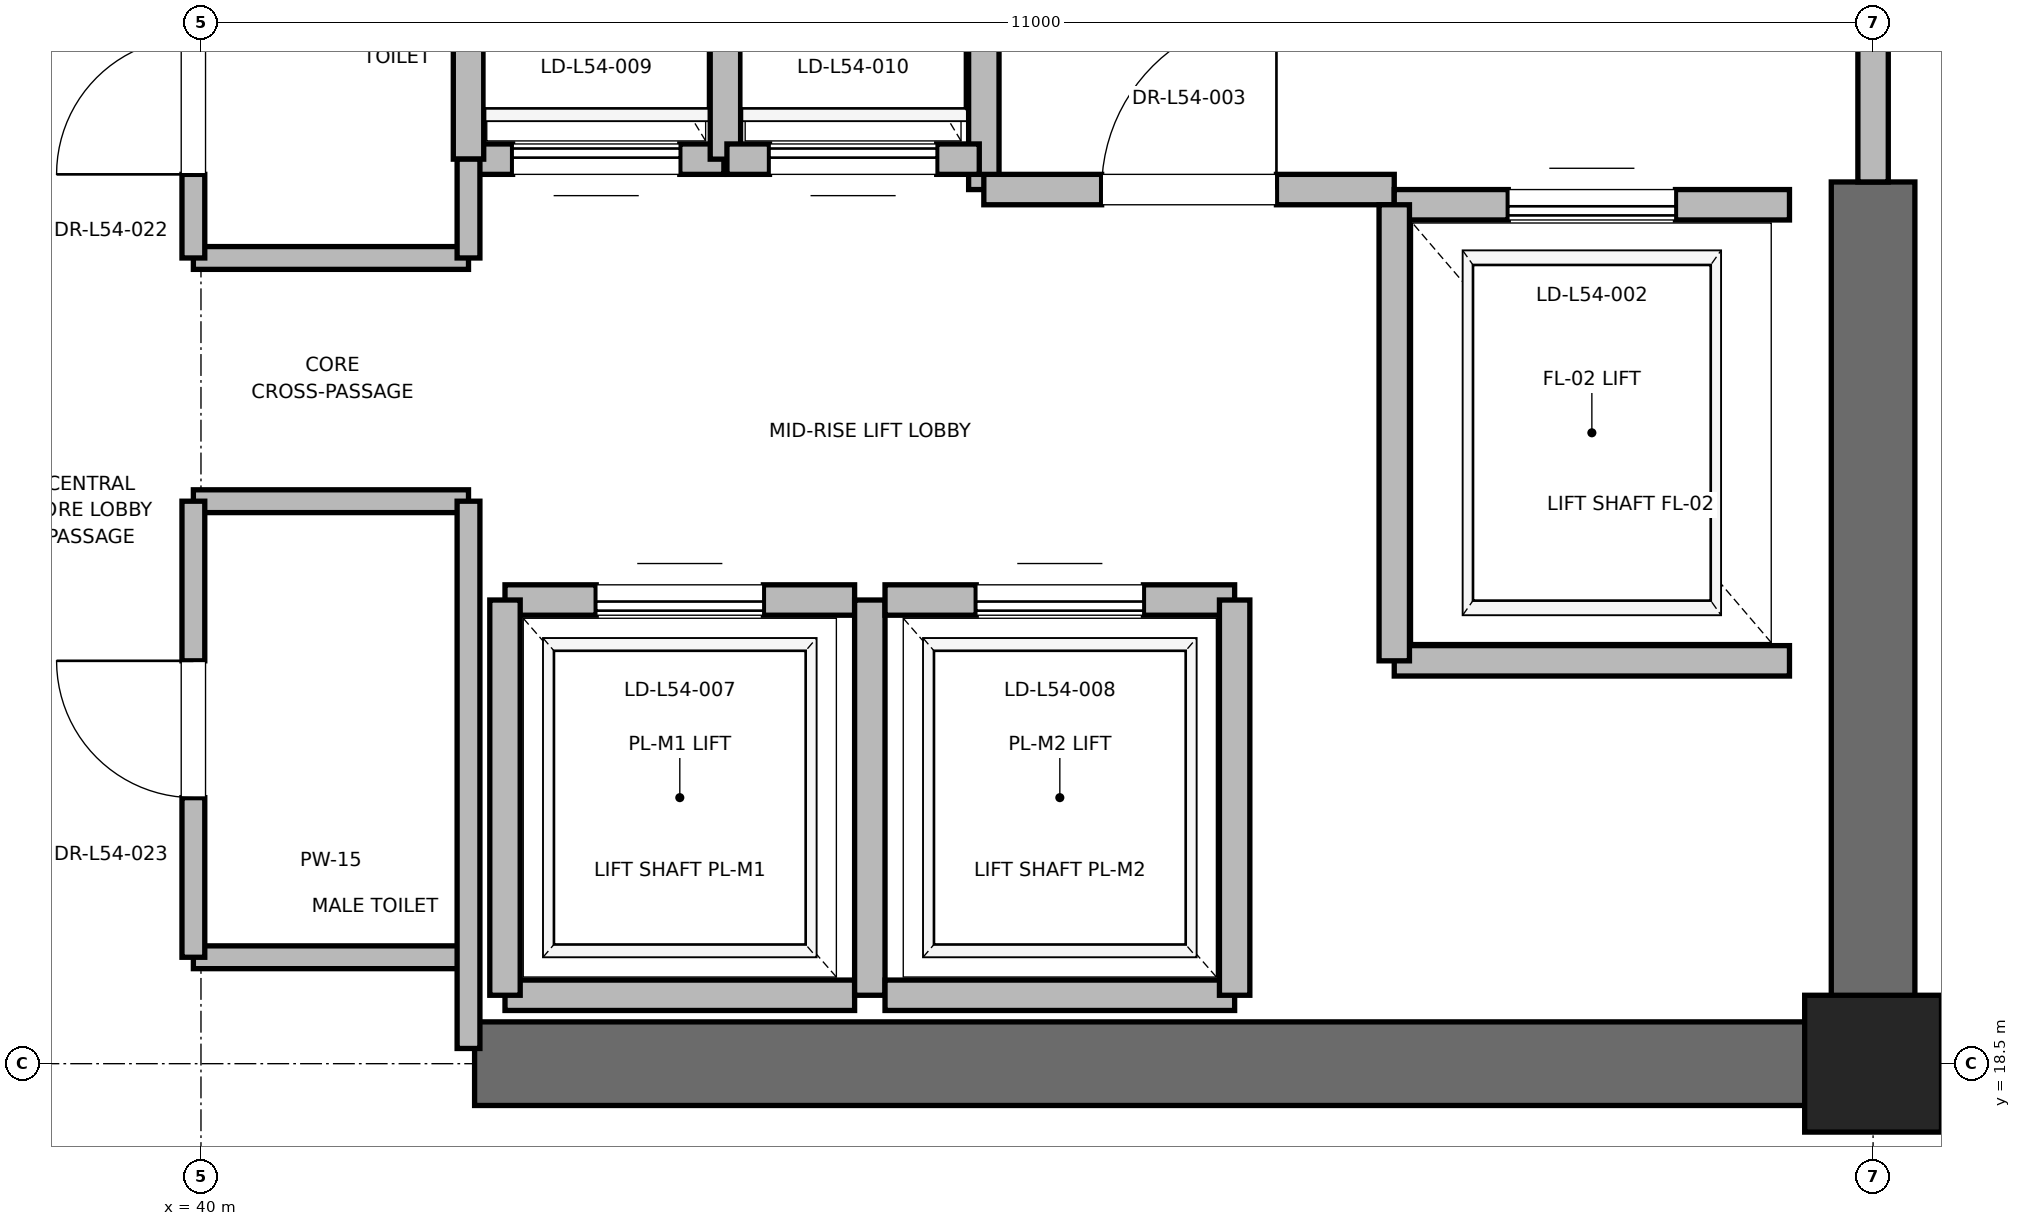
"""IFC4 building model, lengths in metres.
Left out: names, types, materials, properties, quantities, classifications, styles, units other than length and angle.
Written with IfcOpenShell. Run it as: python <this file> out.ifc"""

import sys

from ifc_helpers import new_model, si_unit, direction, frame, frame_2d, origin, origin_2d, place, context, subcontext, project, spatial, rectangle, extrude, element, fill, save


model = new_model("IFC4")
c1 = context("Model", 3, precision=1e-05, world=origin(), true_north=direction((0.0, 1.0)))
c2 = subcontext(c1, "Body", "Model", "MODEL_VIEW")
j1 = project(units=[si_unit("LENGTHUNIT", "METRE"), si_unit("PLANEANGLEUNIT", "RADIAN")], contexts=[c1])
p1 = place(None, origin())
s1 = spatial("IfcSite", under=j1, at=p1, CompositionType="ELEMENT")
p2 = place(p1, origin())
s2 = spatial("IfcBuilding", under=s1, at=p2, CompositionType="ELEMENT")
p3 = place(p2, frame((0.0, 0.0, 233.2)))
s3 = spatial("IfcBuildingStorey", under=s2, at=p3, CompositionType="ELEMENT", Elevation=233.2)
p4 = place(p3, frame((51.0, 18.5, 0.0), z_axis=(0.0, 0.0, 1.0), x_axis=(1.0, 0.0, 0.0)))
e1 = element("IfcColumn", 1, at=p4, inside=s3, PredefinedType="PILASTER", context=c2, shape_type="SweptSolid", body=[
    extrude(rectangle(XDim=0.9, YDim=0.9, at=origin_2d()), origin(), (0.0, 0.0, 1.0), 5.0),
])
p5 = place(p3, frame((41.8, 18.5, 0.0), z_axis=(0.0, 0.0, 1.0), x_axis=(1.0, 0.0, 0.0)))
e2 = element("IfcWall", 2, at=p5, inside=s3, PredefinedType="SHEAR", context=c2, shape_type="SweptSolid", body=[
    extrude(rectangle(XDim=9.2, YDim=0.55, at=frame_2d((4.6, 0.0))), origin(), (0.0, 0.0, 1.0), 4.7),
])
p6 = place(p3, frame((51.0, 18.5, 0.0), z_axis=(0.0, 0.0, 1.0), x_axis=(0.0, 1.0, 0.0)))
e3 = element("IfcWall", 3, at=p6, inside=s3, PredefinedType="SHEAR", context=c2, shape_type="SweptSolid", body=[
    extrude(rectangle(XDim=5.8, YDim=0.55, at=frame_2d((2.9, 0.0))), origin(), (0.0, 0.0, 1.0), 4.7),
])
p7 = place(p3, frame((45.15, 24.25, 0.0), z_axis=(0.0, 0.0, 1.0), x_axis=(0.0, 1.0, 0.0)))
e4 = element("IfcWall", 4, at=p7, inside=s3, PredefinedType="PARTITIONING", context=c2, shape_type="SweptSolid", body=[
    extrude(rectangle(XDim=3.37, YDim=0.2, at=frame_2d((1.685, 0.0))), origin(), (0.0, 0.0, 1.0), 4.7),
])
p8 = place(p3, frame((45.15, 24.25, 0.0), z_axis=(0.0, 0.0, 1.0), x_axis=(1.0, 0.0, 0.0)))
e5 = element("IfcWall", 5, at=p8, inside=s3, PredefinedType="PARTITIONING", context=c2, shape_type="SweptSolid", body=[
    extrude(rectangle(XDim=2.7, YDim=0.2, at=frame_2d((1.35, 0.0))), origin(), (0.0, 0.0, 1.0), 4.7),
])
p9 = place(p8, frame((0.775, 0.0, 0.0)))
e6 = element("IfcOpeningElement", 6, at=p9, cuts=e5, PredefinedType="OPENING", context=c2, shape_type="SweptSolid", body=[
    extrude(rectangle(XDim=1.15, YDim=2.2, at=frame_2d((0.575, 1.1))), frame((0.0, 0.1, 0.0), z_axis=(0.0, -1.0, 0.0), x_axis=(1.0, 0.0, 0.0)), (0.0, 0.0, 1.0), 0.2),
])
p10 = place(p3, frame((51.0, 24.3, 0.0), z_axis=(0.0, 0.0, 1.0), x_axis=(0.0, 1.0, 0.0)))
e7 = element("IfcWall", 7, at=p10, inside=s3, PredefinedType="PARTITIONING", context=c2, shape_type="SweptSolid", body=[
    extrude(rectangle(XDim=3.4, YDim=0.2, at=frame_2d((1.7, 0.0))), origin(), (0.0, 0.0, 1.0), 3.68),
])
p11 = place(p10, frame((1.125, 0.0, 0.0)))
e8 = element("IfcOpeningElement", 8, at=p11, cuts=e7, PredefinedType="OPENING", context=c2, shape_type="SweptSolid", body=[
    extrude(rectangle(XDim=1.15, YDim=2.2, at=frame_2d((0.575, 1.1))), frame((0.0, 0.1, 0.0), z_axis=(0.0, -1.0, 0.0), x_axis=(1.0, 0.0, 0.0)), (0.0, 0.0, 1.0), 0.2),
])
p12 = place(p3, frame((47.85, 21.15, 0.0), z_axis=(0.0, 0.0, 1.0), x_axis=(1.0, 0.0, 0.0)))
e9 = element("IfcWall", 9, at=p12, inside=s3, PredefinedType="SOLIDWALL", context=c2, shape_type="SweptSolid", body=[
    extrude(rectangle(XDim=2.6, YDim=0.2, at=frame_2d((1.3, 0.0))), origin(), (0.0, 0.0, 1.0), 4.7),
])
p13 = place(p3, frame((50.45, 24.15, 0.0), z_axis=(0.0, 0.0, 1.0), x_axis=(-1.0, 0.0, 0.0)))
e10 = element("IfcWall", 10, at=p13, inside=s3, PredefinedType="SOLIDWALL", context=c2, shape_type="SweptSolid", body=[
    extrude(rectangle(XDim=2.6, YDim=0.2, at=frame_2d((1.3, 0.0))), origin(), (0.0, 0.0, 1.0), 3.68),
])
p14 = place(p13, frame((0.75, 0.0, 0.0)))
e11 = element("IfcOpeningElement", 11, at=p14, cuts=e10, PredefinedType="OPENING", context=c2, shape_type="SweptSolid", body=[
    extrude(rectangle(XDim=1.1, YDim=2.2, at=frame_2d((0.55, 1.1))), frame((0.0, 0.1, 0.0), z_axis=(0.0, -1.0, 0.0), x_axis=(1.0, 0.0, 0.0)), (0.0, 0.0, 1.0), 0.2),
])
p15 = place(p3, frame((47.85, 24.15, 0.0), z_axis=(0.0, 0.0, 1.0), x_axis=(0.0, -1.0, 0.0)))
e12 = element("IfcWall", 12, at=p15, inside=s3, PredefinedType="SOLIDWALL", context=c2, shape_type="SweptSolid", body=[
    extrude(rectangle(XDim=3.0, YDim=0.2, at=frame_2d((1.5, 0.0))), origin(), (0.0, 0.0, 1.0), 4.7),
])
p16 = place(p3, frame((42.0, 18.95, 0.0), z_axis=(0.0, 0.0, 1.0), x_axis=(1.0, 0.0, 0.0)))
e13 = element("IfcWall", 13, at=p16, inside=s3, PredefinedType="SOLIDWALL", context=c2, shape_type="SweptSolid", body=[
    extrude(rectangle(XDim=2.3, YDim=0.2, at=frame_2d((1.15, 0.0))), origin(), (0.0, 0.0, 1.0), 3.68),
])
p17 = place(p3, frame((44.3, 21.55, 0.0), z_axis=(0.0, 0.0, 1.0), x_axis=(-1.0, 0.0, 0.0)))
e14 = element("IfcWall", 14, at=p17, inside=s3, PredefinedType="SOLIDWALL", context=c2, shape_type="SweptSolid", body=[
    extrude(rectangle(XDim=2.3, YDim=0.2, at=frame_2d((1.15, 0.0))), origin(), (0.0, 0.0, 1.0), 4.7),
])
p18 = place(p17, frame((0.6, 0.0, 0.0)))
e15 = element("IfcOpeningElement", 15, at=p18, cuts=e14, PredefinedType="OPENING", context=c2, shape_type="SweptSolid", body=[
    extrude(rectangle(XDim=1.1, YDim=2.2, at=frame_2d((0.55, 1.1))), frame((0.0, 0.1, 0.0), z_axis=(0.0, -1.0, 0.0), x_axis=(1.0, 0.0, 0.0)), (0.0, 0.0, 1.0), 0.2),
])
p19 = place(p3, frame((42.0, 21.55, 0.0), z_axis=(0.0, 0.0, 1.0), x_axis=(0.0, -1.0, 0.0)))
e16 = element("IfcWall", 16, at=p19, inside=s3, PredefinedType="SOLIDWALL", context=c2, shape_type="SweptSolid", body=[
    extrude(rectangle(XDim=2.6, YDim=0.2, at=frame_2d((1.3, 0.0))), origin(), (0.0, 0.0, 1.0), 3.68),
])
p20 = place(p3, frame((44.4, 18.95, 0.0), z_axis=(0.0, 0.0, 1.0), x_axis=(0.0, 1.0, 0.0)))
e17 = element("IfcWall", 17, at=p20, inside=s3, PredefinedType="SOLIDWALL", context=c2, shape_type="SweptSolid", body=[
    extrude(rectangle(XDim=2.6, YDim=0.2, at=frame_2d((1.3, 0.0))), origin(), (0.0, 0.0, 1.0), 4.7),
])
p21 = place(p3, frame((44.5, 18.95, 0.0), z_axis=(0.0, 0.0, 1.0), x_axis=(1.0, 0.0, 0.0)))
e18 = element("IfcWall", 18, at=p21, inside=s3, PredefinedType="SOLIDWALL", context=c2, shape_type="SweptSolid", body=[
    extrude(rectangle(XDim=2.3, YDim=0.2, at=frame_2d((1.15, 0.0))), origin(), (0.0, 0.0, 1.0), 4.7),
])
p22 = place(p3, frame((46.8, 21.55, 0.0), z_axis=(0.0, 0.0, 1.0), x_axis=(-1.0, 0.0, 0.0)))
e19 = element("IfcWall", 19, at=p22, inside=s3, PredefinedType="SOLIDWALL", context=c2, shape_type="SweptSolid", body=[
    extrude(rectangle(XDim=2.3, YDim=0.2, at=frame_2d((1.15, 0.0))), origin(), (0.0, 0.0, 1.0), 4.7),
])
p23 = place(p22, frame((0.6, 0.0, 0.0)))
e20 = element("IfcOpeningElement", 20, at=p23, cuts=e19, PredefinedType="OPENING", context=c2, shape_type="SweptSolid", body=[
    extrude(rectangle(XDim=1.1, YDim=2.2, at=frame_2d((0.55, 1.1))), frame((0.0, 0.1, 0.0), z_axis=(0.0, -1.0, 0.0), x_axis=(1.0, 0.0, 0.0)), (0.0, 0.0, 1.0), 0.2),
])
p24 = place(p3, frame((46.8, 18.95, 0.0), z_axis=(0.0, 0.0, 1.0), x_axis=(0.0, 1.0, 0.0)))
e21 = element("IfcWall", 21, at=p24, inside=s3, PredefinedType="SOLIDWALL", context=c2, shape_type="SweptSolid", body=[
    extrude(rectangle(XDim=2.6, YDim=0.2, at=frame_2d((1.3, 0.0))), origin(), (0.0, 0.0, 1.0), 4.7),
])
p25 = place(p3, frame((41.76, 24.45, 0.0), z_axis=(0.0, 0.0, 1.0), x_axis=(1.0, 0.0, 0.0)))
e22 = element("IfcWall", 22, at=p25, inside=s3, PredefinedType="SOLIDWALL", context=c2, shape_type="SweptSolid", body=[
    extrude(rectangle(XDim=1.68, YDim=0.2, at=frame_2d((0.84, 0.0))), origin(), (0.0, 0.0, 1.0), 4.7),
])
p26 = place(p25, frame((0.29, 0.0, 0.0)))
e23 = element("IfcOpeningElement", 23, at=p26, cuts=e22, PredefinedType="OPENING", context=c2, shape_type="SweptSolid", body=[
    extrude(rectangle(XDim=1.1, YDim=2.2, at=frame_2d((0.55, 1.1))), frame((0.0, 0.1, 0.0), z_axis=(0.0, -1.0, 0.0), x_axis=(1.0, 0.0, 0.0)), (0.0, 0.0, 1.0), 0.2),
])
for number, where, z_axis, x_axis in (
    (24, (41.76, 27.05, 0.0), (0.0, 0.0, 1.0), (0.0, -1.0, 0.0)),
    (25, (43.45, 24.45, 0.0), (0.0, 0.0, 1.0), (0.0, 1.0, 0.0)),
):
    element("IfcWall", number, at=place(p3, frame(where, z_axis=z_axis, x_axis=x_axis)), inside=s3, PredefinedType="SOLIDWALL", context=c2, shape_type="SweptSolid", body=[
        extrude(rectangle(XDim=2.6, YDim=0.2, at=frame_2d((1.3, 0.0))), origin(), (0.0, 0.0, 1.0), 4.7),
    ])
p27 = place(p3, frame((43.46, 24.45, 0.0), z_axis=(0.0, 0.0, 1.0), x_axis=(1.0, 0.0, 0.0)))
e26 = element("IfcWall", 26, at=p27, inside=s3, PredefinedType="SOLIDWALL", context=c2, shape_type="SweptSolid", body=[
    extrude(rectangle(XDim=1.66, YDim=0.2, at=frame_2d((0.83, 0.0))), origin(), (0.0, 0.0, 1.0), 4.7),
])
p28 = place(p27, frame((0.28, 0.0, 0.0)))
e27 = element("IfcOpeningElement", 27, at=p28, cuts=e26, PredefinedType="OPENING", context=c2, shape_type="SweptSolid", body=[
    extrude(rectangle(XDim=1.1, YDim=2.2, at=frame_2d((0.55, 1.1))), frame((0.0, 0.1, 0.0), z_axis=(0.0, -1.0, 0.0), x_axis=(1.0, 0.0, 0.0)), (0.0, 0.0, 1.0), 0.2),
])
for number, where, z_axis, x_axis in (
    (28, (39.95, 19.2, 0.0), (0.0, 0.0, 1.0), (1.0, 0.0, 0.0)),
    (29, (39.95, 22.2, 0.0), (0.0, 0.0, 1.0), (1.0, 0.0, 0.0)),
    (30, (39.95, 23.8, 0.0), (0.0, 0.0, 1.0), (1.0, 0.0, 0.0)),
):
    element("IfcWall", number, at=place(p3, frame(where, z_axis=z_axis, x_axis=x_axis)), inside=s3, PredefinedType="PARTITIONING", context=c2, shape_type="SweptSolid", body=[
        extrude(rectangle(XDim=1.81, YDim=0.15, at=frame_2d((0.905, 0.0))), origin(), (0.0, 0.0, 1.0), 2.85),
    ])
p29 = place(p3, frame((41.76, 18.6, 0.0), z_axis=(0.0, 0.0, 1.0), x_axis=(0.0, 1.0, 0.0)))
e31 = element("IfcWall", 31, at=p29, inside=s3, PredefinedType="PARTITIONING", context=c2, shape_type="SweptSolid", body=[
    extrude(rectangle(XDim=3.6, YDim=0.15, at=frame_2d((1.8, 0.0))), origin(), (0.0, 0.0, 1.0), 2.85),
])
p30 = place(p3, frame((41.76, 23.8, 0.0), z_axis=(0.0, 0.0, 1.0), x_axis=(0.0, 1.0, 0.0)))
e32 = element("IfcWall", 32, at=p30, inside=s3, PredefinedType="PARTITIONING", context=c2, shape_type="SweptSolid", body=[
    extrude(rectangle(XDim=0.65, YDim=0.15, at=frame_2d((0.325, 0.0))), origin(), (0.0, 0.0, 1.0), 2.85),
])
p31 = place(p3, frame((39.95, 19.2, 0.0), z_axis=(0.0, 0.0, 1.0), x_axis=(0.0, 1.0, 0.0)))
e33 = element("IfcWall", 33, at=p31, inside=s3, PredefinedType="PARTITIONING", context=c2, shape_type="SweptSolid", body=[
    extrude(rectangle(XDim=3.0, YDim=0.15, at=frame_2d((1.5, 0.0))), origin(), (0.0, 0.0, 1.0), 2.85),
])
p32 = place(p31, frame((1.05, 0.0, 0.0)))
e34 = element("IfcOpeningElement", 34, at=p32, cuts=e33, PredefinedType="OPENING", context=c2, shape_type="SweptSolid", body=[
    extrude(rectangle(XDim=0.9, YDim=2.1, at=frame_2d((0.45, 1.05))), frame((0.0, 0.075, 0.0), z_axis=(0.0, -1.0, 0.0), x_axis=(1.0, 0.0, 0.0)), (0.0, 0.0, 1.0), 0.15),
])
p33 = place(p3, frame((39.95, 23.8, 0.0), z_axis=(0.0, 0.0, 1.0), x_axis=(0.0, 1.0, 0.0)))
e35 = element("IfcWall", 35, at=p33, inside=s3, PredefinedType="PARTITIONING", context=c2, shape_type="SweptSolid", body=[
    extrude(rectangle(XDim=2.0, YDim=0.15, at=frame_2d((1.0, 0.0))), origin(), (0.0, 0.0, 1.0), 2.85),
])
p34 = place(p33, frame((0.55, 0.0, 0.0)))
e36 = element("IfcOpeningElement", 36, at=p34, cuts=e35, PredefinedType="OPENING", context=c2, shape_type="SweptSolid", body=[
    extrude(rectangle(XDim=0.9, YDim=2.1, at=frame_2d((0.45, 1.05))), frame((0.0, 0.075, 0.0), z_axis=(0.0, -1.0, 0.0), x_axis=(1.0, 0.0, 0.0)), (0.0, 0.0, 1.0), 0.15),
])
p35 = place(p9, origin())
e37 = element("IfcDoor", 37, at=p35, inside=s3, OperationType="SINGLE_SWING_RIGHT", PredefinedType="DOOR", context=c2, shape_type="SweptSolid", body=[
    extrude(rectangle(XDim=1.15, YDim=2.2, at=frame_2d((0.575, 1.1))), frame((0.0, 0.025, 0.0), z_axis=(0.0, -1.0, 0.0), x_axis=(1.0, 0.0, 0.0)), (0.0, 0.0, 1.0), 0.05),
])
fill(e6, e37)
p36 = place(p14, origin())
e38 = element("IfcDoor", 38, at=p36, inside=s3, OperationType="SLIDING_TO_RIGHT", PredefinedType="DOOR", context=c2, shape_type="SweptSolid", body=[
    extrude(rectangle(XDim=1.1, YDim=2.2, at=frame_2d((0.55, 1.1))), frame((0.0, 0.025, 0.0), z_axis=(0.0, -1.0, 0.0), x_axis=(1.0, 0.0, 0.0)), (0.0, 0.0, 1.0), 0.05),
])
fill(e11, e38)
p37 = place(p18, origin())
e39 = element("IfcDoor", 39, at=p37, inside=s3, OperationType="SLIDING_TO_RIGHT", PredefinedType="DOOR", context=c2, shape_type="SweptSolid", body=[
    extrude(rectangle(XDim=1.1, YDim=2.2, at=frame_2d((0.55, 1.1))), frame((0.0, 0.025, 0.0), z_axis=(0.0, -1.0, 0.0), x_axis=(1.0, 0.0, 0.0)), (0.0, 0.0, 1.0), 0.05),
])
fill(e15, e39)
p38 = place(p23, origin())
e40 = element("IfcDoor", 40, at=p38, inside=s3, OperationType="SLIDING_TO_RIGHT", PredefinedType="DOOR", context=c2, shape_type="SweptSolid", body=[
    extrude(rectangle(XDim=1.1, YDim=2.2, at=frame_2d((0.55, 1.1))), frame((0.0, 0.025, 0.0), z_axis=(0.0, -1.0, 0.0), x_axis=(1.0, 0.0, 0.0)), (0.0, 0.0, 1.0), 0.05),
])
fill(e20, e40)
p39 = place(p26, origin())
e41 = element("IfcDoor", 41, at=p39, inside=s3, OperationType="SLIDING_TO_RIGHT", PredefinedType="DOOR", context=c2, shape_type="SweptSolid", body=[
    extrude(rectangle(XDim=1.1, YDim=2.2, at=frame_2d((0.55, 1.1))), frame((0.0, 0.025, 0.0), z_axis=(0.0, -1.0, 0.0), x_axis=(1.0, 0.0, 0.0)), (0.0, 0.0, 1.0), 0.05),
])
fill(e23, e41)
p40 = place(p28, origin())
e42 = element("IfcDoor", 42, at=p40, inside=s3, OperationType="SLIDING_TO_RIGHT", PredefinedType="DOOR", context=c2, shape_type="SweptSolid", body=[
    extrude(rectangle(XDim=1.1, YDim=2.2, at=frame_2d((0.55, 1.1))), frame((0.0, 0.025, 0.0), z_axis=(0.0, -1.0, 0.0), x_axis=(1.0, 0.0, 0.0)), (0.0, 0.0, 1.0), 0.05),
])
fill(e27, e42)
p41 = place(p32, origin())
e43 = element("IfcDoor", 43, at=p41, inside=s3, OperationType="SINGLE_SWING_RIGHT", PredefinedType="DOOR", context=c2, shape_type="SweptSolid", body=[
    extrude(rectangle(XDim=0.9, YDim=2.1, at=frame_2d((0.45, 1.05))), frame((0.0, 0.025, 0.0), z_axis=(0.0, -1.0, 0.0), x_axis=(1.0, 0.0, 0.0)), (0.0, 0.0, 1.0), 0.05),
])
fill(e34, e43)
p42 = place(p34, origin())
e44 = element("IfcDoor", 44, at=p42, inside=s3, OperationType="SINGLE_SWING_LEFT", PredefinedType="DOOR", context=c2, shape_type="SweptSolid", body=[
    extrude(rectangle(XDim=0.9, YDim=2.1, at=frame_2d((0.45, 1.05))), frame((0.0, 0.025, 0.0), z_axis=(0.0, -1.0, 0.0), x_axis=(1.0, 0.0, 0.0)), (0.0, 0.0, 1.0), 0.05),
])
fill(e36, e44)
save(model, sys.argv[1])
